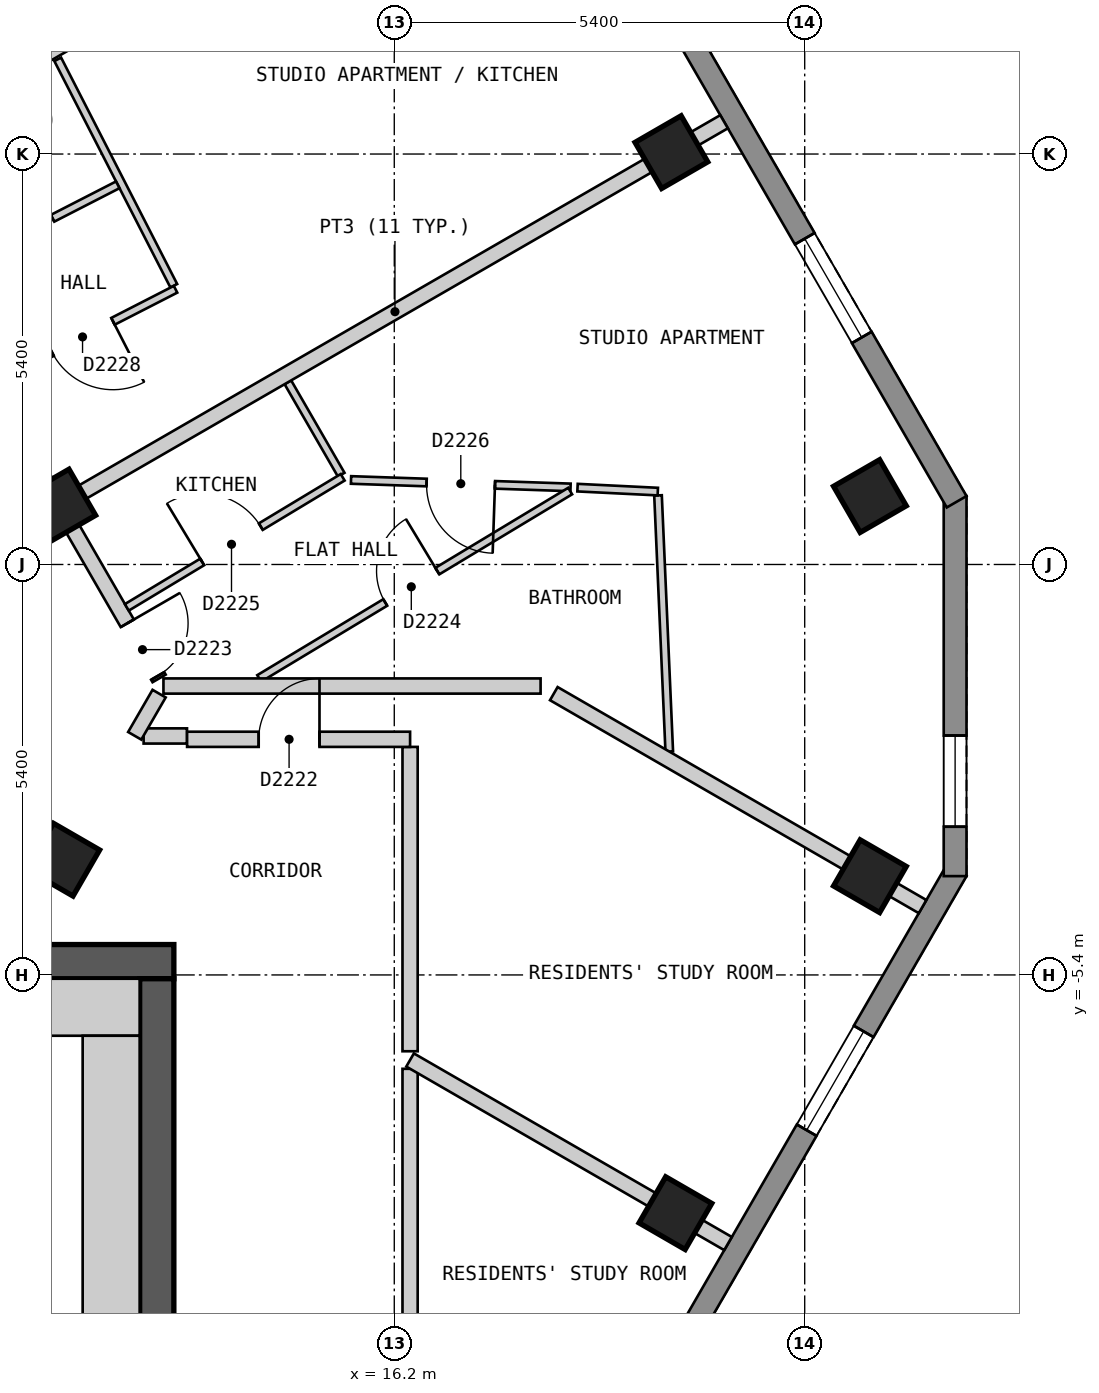
"""IFC4 building model, lengths in metres.
Left out: names, types, materials, properties, quantities, classifications, styles, units other than length and angle.
Written with IfcOpenShell. Run it as: python <this file> out.ifc"""

import sys

from ifc_helpers import new_model, si_unit, direction, frame, frame_2d, origin, origin_2d, place, context, subcontext, project, spatial, polyline, rectangle, outline, extrude, element, fill, save


model = new_model("IFC4")
c1 = context("Model", 3, precision=1e-05, world=origin(), true_north=direction((0.0, 1.0)))
c2 = subcontext(c1, "Body", "Model", "MODEL_VIEW")
j1 = project(units=[si_unit("LENGTHUNIT", "METRE"), si_unit("PLANEANGLEUNIT", "RADIAN")], contexts=[c1])
p1 = place(None, origin())
s1 = spatial("IfcSite", under=j1, at=p1, CompositionType="ELEMENT")
p2 = place(p1, origin())
s2 = spatial("IfcBuilding", under=s1, at=p2, CompositionType="ELEMENT")
p3 = place(p2, frame((0.0, 0.0, 229.8)))
s3 = spatial("IfcBuildingStorey", under=s2, at=p3, CompositionType="ELEMENT", Elevation=229.8)
for number, where, z_axis, x_axis in (
    (1, (19.899, -8.534, 0.0), (0.0, 0.0, 1.0), (0.5, 0.866, 0.0)),
    (2, (22.458, -4.101, 0.0), (0.0, 0.0, 1.0), (0.5, 0.866, 0.0)),
    (3, (22.458, 0.9, 0.0), (0.0, 0.0, 1.0), (-0.5, 0.866, 0.0)),
    (4, (19.846, 5.425, 0.0), (0.0, 0.0, 1.0), (-0.5, 0.866, 0.0)),
    (5, (11.845, -3.884, 0.0), (0.0, 0.0, 1.0), (0.5, 0.866, 0.0)),
    (6, (11.792, 0.775, 0.0), (0.0, 0.0, 1.0), (-0.5, 0.866, 0.0)),
):
    element("IfcColumn", number, at=place(p3, frame(where, z_axis=z_axis, x_axis=x_axis)), inside=s3, PredefinedType="COLUMN", context=c2, shape_type="SweptSolid", body=[
        extrude(rectangle(XDim=0.7, YDim=0.7, at=origin_2d()), origin(), (0.0, 0.0, 1.0), 3.0),
    ])
p4 = place(p3, frame((-13.3, -5.225, 0.0), z_axis=(0.0, 0.0, 1.0), x_axis=(1.0, 0.0, 0.0)))
e7 = element("IfcWall", 7, at=p4, inside=s3, PredefinedType="SHEAR", context=c2, shape_type="SweptSolid", body=[
    extrude(rectangle(XDim=26.6, YDim=0.45, at=frame_2d((13.3, 0.0))), origin(), (0.0, 0.0, 1.0), 2.7),
])
p5 = place(p4, frame((23.65, 0.0, 0.0)))
e8 = element("IfcOpeningElement", 8, at=p5, cuts=e7, PredefinedType="OPENING", context=c2, shape_type="SweptSolid", body=[
    extrude(rectangle(XDim=1.2, YDim=2.1, at=frame_2d((0.6, 1.05))), frame((0.0, 0.235, 0.0), z_axis=(0.0, -1.0, 0.0), x_axis=(1.0, 0.0, 0.0)), (0.0, 0.0, 1.0), 0.47),
])
p6 = place(p3, frame((13.075, -18.55, 0.0), z_axis=(0.0, 0.0, 1.0), x_axis=(0.0, 1.0, 0.0)))
e9 = element("IfcWall", 9, at=p6, inside=s3, PredefinedType="SHEAR", context=c2, shape_type="SweptSolid", body=[
    extrude(rectangle(XDim=13.1, YDim=0.45, at=frame_2d((6.55, 0.0))), origin(), (0.0, 0.0, 1.0), 2.7),
])
p7 = place(p3, frame((15.285, -18.425, 0.0), z_axis=(0.0, 0.0, 1.0), x_axis=(0.500012653391, 0.866018098222, 0.0)))
e10 = element("IfcWall", 10, at=p7, inside=s3, PredefinedType="SOLIDWALL", context=c2, shape_type="SweptSolid", body=[
    extrude(outline(polyline([(0.0, -0.15), (16.628, -0.15), (16.548, 0.15), (0.08, 0.15), (0.0, -0.15)])), origin(), (0.0, 0.0, 1.0), 2.7),
])
p8 = place(p7, frame((2.444, 0.0, 0.15)))
e11 = element("IfcOpeningElement", 11, at=p8, cuts=e10, PredefinedType="OPENING", context=c2, shape_type="SweptSolid", body=[
    extrude(rectangle(XDim=1.5, YDim=2.1, at=frame_2d((0.75, 1.05))), frame((0.0, 0.16, 0.0), z_axis=(0.0, -1.0, 0.0), x_axis=(1.0, 0.0, 0.0)), (0.0, 0.0, 1.0), 0.32),
])
p9 = place(p7, frame((7.564, 0.0, 0.15)))
e12 = element("IfcOpeningElement", 12, at=p9, cuts=e10, PredefinedType="OPENING", context=c2, shape_type="SweptSolid", body=[
    extrude(rectangle(XDim=1.5, YDim=2.1, at=frame_2d((0.75, 1.05))), frame((0.0, 0.16, 0.0), z_axis=(0.0, -1.0, 0.0), x_axis=(1.0, 0.0, 0.0)), (0.0, 0.0, 1.0), 0.32),
])
p10 = place(p7, frame((12.682, 0.0, 0.15)))
e13 = element("IfcOpeningElement", 13, at=p10, cuts=e10, PredefinedType="OPENING", context=c2, shape_type="SweptSolid", body=[
    extrude(rectangle(XDim=1.5, YDim=2.1, at=frame_2d((0.75, 1.05))), frame((0.0, 0.16, 0.0), z_axis=(0.0, -1.0, 0.0), x_axis=(1.0, 0.0, 0.0)), (0.0, 0.0, 1.0), 0.32),
])
p11 = place(p3, frame((23.579, -4.1, 0.0), z_axis=(0.0, 0.0, 1.0), x_axis=(0.0, 1.0, 0.0)))
e14 = element("IfcWall", 14, at=p11, inside=s3, PredefinedType="SOLIDWALL", context=c2, shape_type="SweptSolid", body=[
    extrude(outline(polyline([(0.0, -0.15), (5.0, -0.15), (4.92, 0.15), (0.08, 0.15), (0.0, -0.15)])), origin(), (0.0, 0.0, 1.0), 2.7),
])
p12 = place(p11, frame((0.65, 0.0, 0.15)))
e15 = element("IfcOpeningElement", 15, at=p12, cuts=e14, PredefinedType="OPENING", context=c2, shape_type="SweptSolid", body=[
    extrude(rectangle(XDim=1.2, YDim=2.1, at=frame_2d((0.6, 1.05))), frame((0.0, 0.16, 0.0), z_axis=(0.0, -1.0, 0.0), x_axis=(1.0, 0.0, 0.0)), (0.0, 0.0, 1.0), 0.32),
])
p13 = place(p3, frame((23.599, 0.825, 0.0), z_axis=(0.0, 0.0, 1.0), x_axis=(-0.500003656944, 0.866023292436, 0.0)))
e16 = element("IfcWall", 16, at=p13, inside=s3, PredefinedType="SOLIDWALL", context=c2, shape_type="SweptSolid", body=[
    extrude(outline(polyline([(0.0, -0.15), (22.17, -0.15), (22.09, 0.15), (0.08, 0.15), (0.0, -0.15)])), origin(), (0.0, 0.0, 1.0), 2.7),
])
p14 = place(p13, frame((2.497, 0.0, 0.15)))
e17 = element("IfcOpeningElement", 17, at=p14, cuts=e16, PredefinedType="OPENING", context=c2, shape_type="SweptSolid", body=[
    extrude(rectangle(XDim=1.5, YDim=2.1, at=frame_2d((0.75, 1.05))), frame((0.0, 0.16, 0.0), z_axis=(0.0, -1.0, 0.0), x_axis=(1.0, 0.0, 0.0)), (0.0, 0.0, 1.0), 0.32),
])
p15 = place(p13, frame((7.723, 0.0, 0.15)))
e18 = element("IfcOpeningElement", 18, at=p15, cuts=e16, PredefinedType="OPENING", context=c2, shape_type="SweptSolid", body=[
    extrude(rectangle(XDim=1.5, YDim=2.1, at=frame_2d((0.75, 1.05))), frame((0.0, 0.16, 0.0), z_axis=(0.0, -1.0, 0.0), x_axis=(1.0, 0.0, 0.0)), (0.0, 0.0, 1.0), 0.32),
])
p16 = place(p13, frame((12.948, 0.0, 0.15)))
e19 = element("IfcOpeningElement", 19, at=p16, cuts=e16, PredefinedType="OPENING", context=c2, shape_type="SweptSolid", body=[
    extrude(rectangle(XDim=1.5, YDim=2.1, at=frame_2d((0.75, 1.05))), frame((0.0, 0.16, 0.0), z_axis=(0.0, -1.0, 0.0), x_axis=(1.0, 0.0, 0.0)), (0.0, 0.0, 1.0), 0.32),
])
p17 = place(p13, frame((18.173, 0.0, 0.15)))
e20 = element("IfcOpeningElement", 20, at=p17, cuts=e16, PredefinedType="OPENING", context=c2, shape_type="SweptSolid", body=[
    extrude(rectangle(XDim=1.5, YDim=2.1, at=frame_2d((0.75, 1.05))), frame((0.0, 0.16, 0.0), z_axis=(0.0, -1.0, 0.0), x_axis=(1.0, 0.0, 0.0)), (0.0, 0.0, 1.0), 0.32),
])
p18 = place(p3, frame((9.238, 5.2, 0.0), z_axis=(0.0, 0.0, 1.0), x_axis=(0.500025705601, -0.86601056214, 0.0)))
e21 = element("IfcWall", 21, at=p18, inside=s3, PredefinedType="PARTITIONING", context=c2, shape_type="SweptSolid", body=[
    extrude(rectangle(XDim=7.735, YDim=0.2, at=frame_2d((3.868, 0.0))), origin(), (0.0, 0.0, 1.0), 2.7),
])
p19 = place(p18, frame((6.898, 0.0, 0.0)))
e22 = element("IfcOpeningElement", 22, at=p19, cuts=e21, PredefinedType="OPENING", context=c2, shape_type="SweptSolid", body=[
    extrude(rectangle(XDim=0.8, YDim=2.1, at=frame_2d((0.4, 1.05))), frame((0.0, 0.11, 0.0), z_axis=(0.0, -1.0, 0.0), x_axis=(1.0, 0.0, 0.0)), (0.0, 0.0, 1.0), 0.22),
])
p20 = place(p18, frame((1.988, 0.0, 0.0)))
e23 = element("IfcOpeningElement", 23, at=p20, cuts=e21, PredefinedType="OPENING", context=c2, shape_type="SweptSolid", body=[
    extrude(rectangle(XDim=1.0, YDim=2.1, at=frame_2d((0.5, 1.05))), frame((0.0, 0.11, 0.0), z_axis=(0.0, -1.0, 0.0), x_axis=(1.0, 0.0, 0.0)), (0.0, 0.0, 1.0), 0.22),
])
p21 = place(p3, frame((16.408, -2.4, 0.0), z_axis=(0.0, 0.0, 1.0), x_axis=(0.0, -1.0, 0.0)))
e24 = element("IfcWall", 24, at=p21, inside=s3, PredefinedType="PARTITIONING", context=c2, shape_type="SweptSolid", body=[
    extrude(rectangle(XDim=4.004, YDim=0.2, at=frame_2d((2.002, 0.0))), origin(), (0.0, 0.0, 1.0), 2.7),
])
p22 = place(p3, frame((12.902, -2.256, 0.0), z_axis=(0.0, 0.0, 1.0), x_axis=(1.0, 0.0, 0.0)))
e25 = element("IfcWall", 25, at=p22, inside=s3, PredefinedType="PARTITIONING", context=c2, shape_type="SweptSolid", body=[
    extrude(rectangle(XDim=0.571, YDim=0.2, at=frame_2d((0.285, 0.0))), origin(), (0.0, 0.0, 1.0), 2.7),
])
p23 = place(p3, frame((13.474, -2.3, 0.0), z_axis=(0.0, 0.0, 1.0), x_axis=(1.0, 0.0, 0.0)))
e26 = element("IfcWall", 26, at=p23, inside=s3, PredefinedType="PARTITIONING", context=c2, shape_type="SweptSolid", body=[
    extrude(rectangle(XDim=2.934, YDim=0.2, at=frame_2d((1.467, 0.0))), origin(), (0.0, 0.0, 1.0), 2.7),
])
p24 = place(p23, frame((0.942, 0.0, 0.0)))
e27 = element("IfcOpeningElement", 27, at=p24, cuts=e26, PredefinedType="OPENING", context=c2, shape_type="SweptSolid", body=[
    extrude(rectangle(XDim=0.8, YDim=2.1, at=frame_2d((0.4, 1.05))), frame((0.0, 0.11, 0.0), z_axis=(0.0, -1.0, 0.0), x_axis=(1.0, 0.0, 0.0)), (0.0, 0.0, 1.0), 0.22),
])
p25 = place(p3, frame((12.785, -2.254, 0.0), z_axis=(0.0, 0.0, 1.0), x_axis=(0.500766044352, 0.865582675903, 0.0)))
e28 = element("IfcWall", 28, at=p25, inside=s3, PredefinedType="PARTITIONING", context=c2, shape_type="SweptSolid", body=[
    extrude(rectangle(XDim=0.641, YDim=0.2, at=frame_2d((0.321, 0.0))), origin(), (0.0, 0.0, 1.0), 2.7),
])
p26 = place(p3, frame((16.408, -16.179, 0.0), z_axis=(0.0, 0.0, 1.0), x_axis=(0.0, 1.0, 0.0)))
e29 = element("IfcWall", 29, at=p26, inside=s3, PredefinedType="PARTITIONING", context=c2, shape_type="SweptSolid", body=[
    extrude(rectangle(XDim=9.544, YDim=0.2, at=frame_2d((4.772, 0.0))), origin(), (0.0, 0.0, 1.0), 2.7),
])
p27 = place(p26, frame((4.358, 0.0, 0.0)))
e30 = element("IfcOpeningElement", 30, at=p27, cuts=e29, PredefinedType="OPENING", context=c2, shape_type="SweptSolid", body=[
    extrude(rectangle(XDim=0.8, YDim=2.1, at=frame_2d((0.4, 1.05))), frame((0.0, 0.11, 0.0), z_axis=(0.0, -1.0, 0.0), x_axis=(1.0, 0.0, 0.0)), (0.0, 0.0, 1.0), 0.22),
])
p28 = place(p3, frame((14.8, 2.397, 0.0), z_axis=(0.0, 0.0, 1.0), x_axis=(0.49989805765, -0.866084252228, 0.0)))
e31 = element("IfcWall", 31, at=p28, inside=s3, PredefinedType="PARTITIONING", context=c2, shape_type="SweptSolid", body=[
    extrude(rectangle(XDim=1.404, YDim=0.1, at=frame_2d((0.702, 0.0))), origin(), (0.0, 0.0, 1.0), 2.7),
])
p29 = place(p3, frame((11.772, 6.646, 0.0), z_axis=(0.0, 0.0, 1.0), x_axis=(0.456175983405, -0.889889584254, 0.0)))
e32 = element("IfcWall", 32, at=p29, inside=s3, PredefinedType="PARTITIONING", context=c2, shape_type="SweptSolid", body=[
    extrude(rectangle(XDim=3.348, YDim=0.1, at=frame_2d((1.674, 0.0))), origin(), (0.0, 0.0, 1.0), 2.7),
])
p30 = place(p3, frame((19.67, 0.909, 0.0), z_axis=(0.0, 0.0, 1.0), x_axis=(0.043933486644, -0.99903445824, 0.0)))
e33 = element("IfcWall", 33, at=p30, inside=s3, PredefinedType="PARTITIONING", context=c2, shape_type="SweptSolid", body=[
    extrude(rectangle(XDim=3.373, YDim=0.1, at=frame_2d((1.687, 0.0))), origin(), (0.0, 0.0, 1.0), 2.7),
])
p31 = place(p3, frame((15.631, 1.112, 0.0), z_axis=(0.0, 0.0, 1.0), x_axis=(0.999423034213, -0.033964668168, 0.0)))
e34 = element("IfcWall", 34, at=p31, inside=s3, PredefinedType="PARTITIONING", context=c2, shape_type="SweptSolid", body=[
    extrude(rectangle(XDim=2.89, YDim=0.1, at=frame_2d((1.445, 0.0))), origin(), (0.0, 0.0, 1.0), 2.7),
])
p32 = place(p31, frame((0.995, 0.0, 0.0)))
e35 = element("IfcOpeningElement", 35, at=p32, cuts=e34, PredefinedType="OPENING", context=c2, shape_type="SweptSolid", body=[
    extrude(rectangle(XDim=0.9, YDim=2.1, at=frame_2d((0.45, 1.05))), frame((0.0, 0.06, 0.0), z_axis=(0.0, -1.0, 0.0), x_axis=(1.0, 0.0, 0.0)), (0.0, 0.0, 1.0), 0.12),
])
p33 = place(p3, frame((10.178, 3.772, 0.0), z_axis=(0.0, 0.0, 1.0), x_axis=(0.889732071959, 0.456483121405, 0.0)))
e36 = element("IfcWall", 36, at=p33, inside=s3, PredefinedType="PARTITIONING", context=c2, shape_type="SweptSolid", body=[
    extrude(rectangle(XDim=2.679, YDim=0.1, at=frame_2d((1.34, 0.0))), origin(), (0.0, 0.0, 1.0), 2.7),
])
p34 = place(p33, frame((0.915, 0.0, 0.0)))
e37 = element("IfcOpeningElement", 37, at=p34, cuts=e36, PredefinedType="OPENING", context=c2, shape_type="SweptSolid", body=[
    extrude(rectangle(XDim=0.8, YDim=2.1, at=frame_2d((0.4, 1.05))), frame((0.0, 0.06, 0.0), z_axis=(0.0, -1.0, 0.0), x_axis=(1.0, 0.0, 0.0)), (0.0, 0.0, 1.0), 0.12),
])
p35 = place(p3, frame((10.963, 2.412, 0.0), z_axis=(0.0, 0.0, 1.0), x_axis=(0.889943997558, 0.456069820543, 0.0)))
e38 = element("IfcWall", 38, at=p35, inside=s3, PredefinedType="PARTITIONING", context=c2, shape_type="SweptSolid", body=[
    extrude(rectangle(XDim=2.651, YDim=0.1, at=frame_2d((1.325, 0.0))), origin(), (0.0, 0.0, 1.0), 2.7),
])
p36 = place(p35, frame((0.826, 0.0, 0.0)))
e39 = element("IfcOpeningElement", 39, at=p36, cuts=e38, PredefinedType="OPENING", context=c2, shape_type="SweptSolid", body=[
    extrude(rectangle(XDim=0.9, YDim=2.1, at=frame_2d((0.45, 1.05))), frame((0.0, 0.06, 0.0), z_axis=(0.0, -1.0, 0.0), x_axis=(1.0, 0.0, 0.0)), (0.0, 0.0, 1.0), 0.12),
])
p37 = place(p3, frame((12.681, -0.564, 0.0), z_axis=(0.0, 0.0, 1.0), x_axis=(0.856575482301, 0.516021746752, 0.0)))
e40 = element("IfcWall", 40, at=p37, inside=s3, PredefinedType="PARTITIONING", context=c2, shape_type="SweptSolid", body=[
    extrude(rectangle(XDim=3.316, YDim=0.1, at=frame_2d((1.658, 0.0))), origin(), (0.0, 0.0, 1.0), 2.7),
])
p38 = place(p37, frame((1.158, 0.0, 0.0)))
e41 = element("IfcOpeningElement", 41, at=p38, cuts=e40, PredefinedType="OPENING", context=c2, shape_type="SweptSolid", body=[
    extrude(rectangle(XDim=0.9, YDim=2.1, at=frame_2d((0.45, 1.05))), frame((0.0, 0.06, 0.0), z_axis=(0.0, -1.0, 0.0), x_axis=(1.0, 0.0, 0.0)), (0.0, 0.0, 1.0), 0.12),
])
p39 = place(p3, frame((14.423, -1.499, 0.0), z_axis=(0.0, 0.0, 1.0), x_axis=(0.856512638305, 0.516126050905, 0.0)))
e42 = element("IfcWall", 42, at=p39, inside=s3, PredefinedType="PARTITIONING", context=c2, shape_type="SweptSolid", body=[
    extrude(rectangle(XDim=4.776, YDim=0.1, at=frame_2d((2.388, 0.0))), origin(), (0.0, 0.0, 1.0), 2.7),
])
p40 = place(p39, frame((1.936, 0.0, 0.0)))
e43 = element("IfcOpeningElement", 43, at=p40, cuts=e42, PredefinedType="OPENING", context=c2, shape_type="SweptSolid", body=[
    extrude(rectangle(XDim=0.8, YDim=2.1, at=frame_2d((0.4, 1.05))), frame((0.0, 0.06, 0.0), z_axis=(0.0, -1.0, 0.0), x_axis=(1.0, 0.0, 0.0)), (0.0, 0.0, 1.0), 0.12),
])
p41 = place(p3, frame((18.299, -1.699, 0.0), z_axis=(0.0, 0.0, 1.0), x_axis=(0.865962789554, -0.50010843535, 0.0)))
e44 = element("IfcWall", 44, at=p41, inside=s3, PredefinedType="PARTITIONING", context=c2, shape_type="SweptSolid", body=[
    extrude(rectangle(XDim=5.603, YDim=0.2, at=frame_2d((2.801, 0.0))), origin(), (0.0, 0.0, 1.0), 2.7),
])
p42 = place(p3, frame((16.408, -6.519, 0.0), z_axis=(0.0, 0.0, 1.0), x_axis=(0.866032396701, -0.499987887718, 0.0)))
e45 = element("IfcWall", 45, at=p42, inside=s3, PredefinedType="PARTITIONING", context=c2, shape_type="SweptSolid", body=[
    extrude(rectangle(XDim=4.83, YDim=0.2, at=frame_2d((2.415, 0.0))), origin(), (0.0, 0.0, 1.0), 2.7),
])
p43 = place(p3, frame((13.163, -1.599, 0.0), z_axis=(0.0, 0.0, 1.0), x_axis=(1.0, 0.0, 0.0)))
e46 = element("IfcWall", 46, at=p43, inside=s3, PredefinedType="PARTITIONING", context=c2, shape_type="SweptSolid", body=[
    extrude(rectangle(XDim=4.962, YDim=0.2, at=frame_2d((2.481, 0.0))), origin(), (0.0, 0.0, 1.0), 2.7),
])
p44 = place(p3, frame((11.879, 0.826, 0.0), z_axis=(0.0, 0.0, 1.0), x_axis=(0.866065245018, 0.499930986609, 0.0)))
e47 = element("IfcWall", 47, at=p44, inside=s3, PredefinedType="PARTITIONING", context=c2, shape_type="SweptSolid", body=[
    extrude(rectangle(XDim=10.0, YDim=0.2, at=frame_2d((5.0, 0.0))), origin(), (0.0, 0.0, 1.0), 2.7),
])
p45 = place(p3, frame((9.457, 5.461, 0.0), z_axis=(0.0, 0.0, 1.0), x_axis=(0.866043818878, 0.499968102766, 0.0)))
e48 = element("IfcWall", 48, at=p45, inside=s3, PredefinedType="PARTITIONING", context=c2, shape_type="SweptSolid", body=[
    extrude(rectangle(XDim=9.779, YDim=0.2, at=frame_2d((4.89, 0.0))), origin(), (0.0, 0.0, 1.0), 2.7),
])
p46 = place(p3, frame((18.611, 1.011, 0.0), z_axis=(0.0, 0.0, 1.0), x_axis=(0.998789491469, -0.049188939117, 0.0)))
e49 = element("IfcWall", 49, at=p46, inside=s3, PredefinedType="PARTITIONING", context=c2, shape_type="SweptSolid", body=[
    extrude(rectangle(XDim=1.057, YDim=0.1, at=frame_2d((0.529, 0.0))), origin(), (0.0, 0.0, 1.0), 2.7),
])
p47 = place(p3, frame((11.55, -5.825, 0.0), z_axis=(0.0, 0.0, 1.0), x_axis=(1.0, 0.0, 0.0)))
e50 = element("IfcWall", 50, at=p47, inside=s3, PredefinedType="PARTITIONING", context=c2, shape_type="SweptSolid", body=[
    extrude(rectangle(XDim=1.3, YDim=0.75, at=frame_2d((0.65, 0.0))), origin(), (0.0, 0.0, 1.0), 2.7),
])
p48 = place(p3, frame((12.475, -14.45, 0.0), z_axis=(0.0, 0.0, 1.0), x_axis=(0.0, 1.0, 0.0)))
e51 = element("IfcWall", 51, at=p48, inside=s3, PredefinedType="PARTITIONING", context=c2, shape_type="SweptSolid", body=[
    extrude(rectangle(XDim=8.25, YDim=0.75, at=frame_2d((4.125, 0.0))), origin(), (0.0, 0.0, 1.0), 2.7),
])
p49 = place(p10, origin())
e52 = element("IfcWindow", 52, at=p49, inside=s3, PartitioningType="SINGLE_PANEL", PredefinedType="WINDOW", context=c2, shape_type="SweptSolid", body=[
    extrude(rectangle(XDim=1.5, YDim=2.1, at=frame_2d((0.75, 1.05))), frame((0.0, 0.03, 0.0), z_axis=(0.0, -1.0, 0.0), x_axis=(1.0, 0.0, 0.0)), (0.0, 0.0, 1.0), 0.06),
])
fill(e13, e52)
p50 = place(p12, origin())
e53 = element("IfcWindow", 53, at=p50, inside=s3, PartitioningType="SINGLE_PANEL", PredefinedType="WINDOW", context=c2, shape_type="SweptSolid", body=[
    extrude(rectangle(XDim=1.2, YDim=2.1, at=frame_2d((0.6, 1.05))), frame((0.0, 0.03, 0.0), z_axis=(0.0, -1.0, 0.0), x_axis=(1.0, 0.0, 0.0)), (0.0, 0.0, 1.0), 0.06),
])
fill(e15, e53)
p51 = place(p14, origin())
e54 = element("IfcWindow", 54, at=p51, inside=s3, PartitioningType="SINGLE_PANEL", PredefinedType="WINDOW", context=c2, shape_type="SweptSolid", body=[
    extrude(rectangle(XDim=1.5, YDim=2.1, at=frame_2d((0.75, 1.05))), frame((0.0, 0.03, 0.0), z_axis=(0.0, -1.0, 0.0), x_axis=(1.0, 0.0, 0.0)), (0.0, 0.0, 1.0), 0.06),
])
fill(e17, e54)
p52 = place(p24, origin())
e55 = element("IfcDoor", 55, at=p52, inside=s3, OperationType="SINGLE_SWING_RIGHT", PredefinedType="DOOR", context=c2, shape_type="SweptSolid", body=[
    extrude(rectangle(XDim=0.8, YDim=2.1, at=frame_2d((0.4, 1.05))), frame((0.0, 0.025, 0.0), z_axis=(0.0, -1.0, 0.0), x_axis=(1.0, 0.0, 0.0)), (0.0, 0.0, 1.0), 0.05),
])
fill(e27, e55)
p53 = place(p19, origin())
e56 = element("IfcDoor", 56, at=p53, inside=s3, OperationType="SINGLE_SWING_LEFT", PredefinedType="DOOR", context=c2, shape_type="SweptSolid", body=[
    extrude(rectangle(XDim=0.8, YDim=2.1, at=frame_2d((0.4, 1.05))), frame((0.0, 0.025, 0.0), z_axis=(0.0, -1.0, 0.0), x_axis=(1.0, 0.0, 0.0)), (0.0, 0.0, 1.0), 0.05),
])
fill(e22, e56)
p54 = place(p40, origin())
e57 = element("IfcDoor", 57, at=p54, inside=s3, OperationType="SINGLE_SWING_RIGHT", PredefinedType="DOOR", context=c2, shape_type="SweptSolid", body=[
    extrude(rectangle(XDim=0.8, YDim=2.1, at=frame_2d((0.4, 1.05))), frame((0.0, 0.025, 0.0), z_axis=(0.0, -1.0, 0.0), x_axis=(1.0, 0.0, 0.0)), (0.0, 0.0, 1.0), 0.05),
])
fill(e43, e57)
p55 = place(p38, origin())
e58 = element("IfcDoor", 58, at=p55, inside=s3, OperationType="SINGLE_SWING_LEFT", PredefinedType="DOOR", context=c2, shape_type="SweptSolid", body=[
    extrude(rectangle(XDim=0.9, YDim=2.1, at=frame_2d((0.45, 1.05))), frame((0.0, 0.025, 0.0), z_axis=(0.0, -1.0, 0.0), x_axis=(1.0, 0.0, 0.0)), (0.0, 0.0, 1.0), 0.05),
])
fill(e41, e58)
p56 = place(p32, origin())
e59 = element("IfcDoor", 59, at=p56, inside=s3, OperationType="SINGLE_SWING_RIGHT", PredefinedType="DOOR", context=c2, shape_type="SweptSolid", body=[
    extrude(rectangle(XDim=0.9, YDim=2.1, at=frame_2d((0.45, 1.05))), frame((0.0, 0.025, 0.0), z_axis=(0.0, -1.0, 0.0), x_axis=(1.0, 0.0, 0.0)), (0.0, 0.0, 1.0), 0.05),
])
fill(e35, e59)
p57 = place(p36, origin())
e60 = element("IfcDoor", 60, at=p57, inside=s3, OperationType="SINGLE_SWING_RIGHT", PredefinedType="DOOR", context=c2, shape_type="SweptSolid", body=[
    extrude(rectangle(XDim=0.9, YDim=2.1, at=frame_2d((0.45, 1.05))), frame((0.0, 0.025, 0.0), z_axis=(0.0, -1.0, 0.0), x_axis=(1.0, 0.0, 0.0)), (0.0, 0.0, 1.0), 0.05),
])
fill(e39, e60)
p58 = place(p34, origin())
e61 = element("IfcDoor", 61, at=p58, inside=s3, OperationType="SINGLE_SWING_LEFT", PredefinedType="DOOR", context=c2, shape_type="SweptSolid", body=[
    extrude(rectangle(XDim=0.8, YDim=2.1, at=frame_2d((0.4, 1.05))), frame((0.0, 0.025, 0.0), z_axis=(0.0, -1.0, 0.0), x_axis=(1.0, 0.0, 0.0)), (0.0, 0.0, 1.0), 0.05),
])
fill(e37, e61)
save(model, sys.argv[1])
